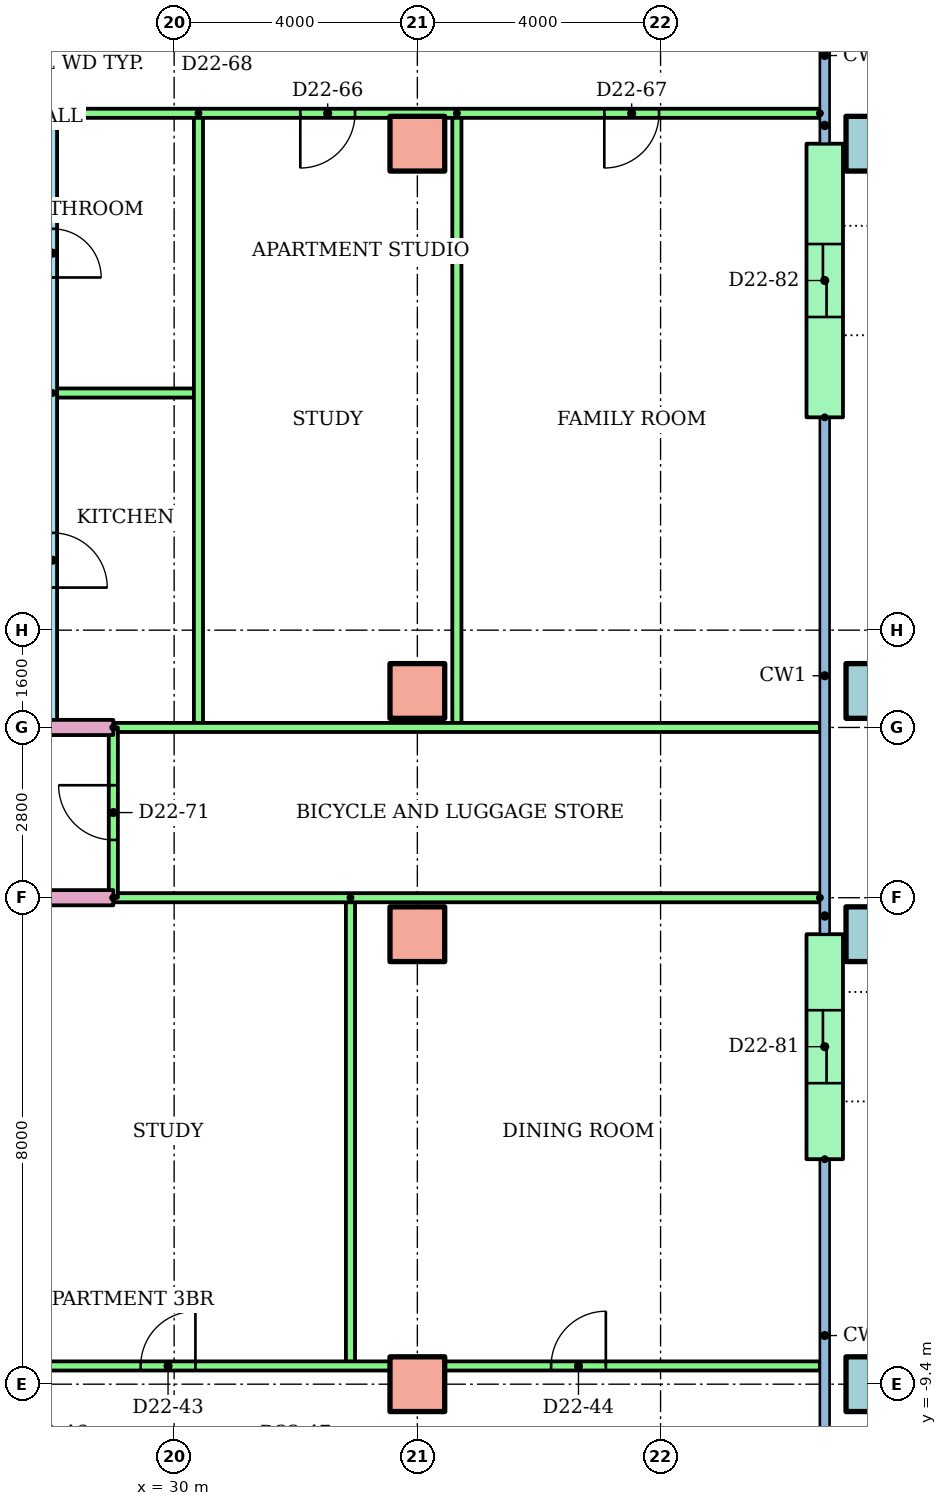
"""IFC4 building model, lengths in metres.
Left out: names, types, materials, properties, quantities, classifications, styles, units other than length and angle.
Written with IfcOpenShell. Run it as: python <this file> out.ifc"""

import sys

from ifc_helpers import new_model, si_unit, direction, frame, frame_2d, origin, origin_2d, place, context, subcontext, project, spatial, rectangle, hollow_rectangle, extrude, element, fill, save


model = new_model("IFC4")
c1 = context("Model", 3, precision=1e-05, world=origin(), true_north=direction((0.0, 1.0)))
c2 = subcontext(c1, "Body", "Model", "MODEL_VIEW")
j1 = project(units=[si_unit("LENGTHUNIT", "METRE"), si_unit("PLANEANGLEUNIT", "RADIAN")], contexts=[c1])
p1 = place(None, origin())
s1 = spatial("IfcSite", under=j1, at=p1, CompositionType="ELEMENT")
p2 = place(p1, origin())
s2 = spatial("IfcBuilding", under=s1, at=p2, CompositionType="ELEMENT")
p3 = place(p2, frame((0.0, 0.0, 87.1)))
s3 = spatial("IfcBuildingStorey", under=s2, at=p3, CompositionType="ELEMENT", Elevation=87.1)
p4 = place(p3, frame((34.0, -9.4, 0.0)))
e1 = element("IfcColumn", 1, at=p4, inside=s3, PredefinedType="COLUMN", context=c2, shape_type="SweptSolid", body=[
    extrude(rectangle(XDim=0.9, YDim=0.9, at=origin_2d()), origin(), (0.0, 0.0, 1.0), 3.2),
])
p5 = place(p3, frame((41.5, -9.4, 0.0)))
e2 = element("IfcColumn", 2, at=p5, inside=s3, PredefinedType="COLUMN", context=c2, shape_type="SweptSolid", body=[
    extrude(hollow_rectangle(XDim=0.9, YDim=0.9, WallThickness=0.045, at=origin_2d()), origin(), (0.0, 0.0, 1.0), 3.2),
])
p6 = place(p3, frame((34.0, -2.0, 0.0)))
e3 = element("IfcColumn", 3, at=p6, inside=s3, PredefinedType="COLUMN", context=c2, shape_type="SweptSolid", body=[
    extrude(rectangle(XDim=0.9, YDim=0.9, at=origin_2d()), origin(), (0.0, 0.0, 1.0), 3.2),
])
p7 = place(p3, frame((41.5, -2.0, 0.0)))
e4 = element("IfcColumn", 4, at=p7, inside=s3, PredefinedType="COLUMN", context=c2, shape_type="SweptSolid", body=[
    extrude(hollow_rectangle(XDim=0.9, YDim=0.9, WallThickness=0.045, at=origin_2d()), origin(), (0.0, 0.0, 1.0), 3.2),
])
p8 = place(p3, frame((34.0, 2.0, 0.0)))
e5 = element("IfcColumn", 5, at=p8, inside=s3, PredefinedType="COLUMN", context=c2, shape_type="SweptSolid", body=[
    extrude(rectangle(XDim=0.9, YDim=0.9, at=origin_2d()), origin(), (0.0, 0.0, 1.0), 3.2),
])
p9 = place(p3, frame((41.5, 2.0, 0.0)))
e6 = element("IfcColumn", 6, at=p9, inside=s3, PredefinedType="COLUMN", context=c2, shape_type="SweptSolid", body=[
    extrude(hollow_rectangle(XDim=0.9, YDim=0.9, WallThickness=0.045, at=origin_2d()), origin(), (0.0, 0.0, 1.0), 3.2),
])
p10 = place(p3, frame((34.0, 11.0, 0.0)))
e7 = element("IfcColumn", 7, at=p10, inside=s3, PredefinedType="COLUMN", context=c2, shape_type="SweptSolid", body=[
    extrude(rectangle(XDim=0.9, YDim=0.9, at=origin_2d()), origin(), (0.0, 0.0, 1.0), 3.2),
])
p11 = place(p3, frame((41.5, 11.0, 0.0)))
e8 = element("IfcColumn", 8, at=p11, inside=s3, PredefinedType="COLUMN", context=c2, shape_type="SweptSolid", body=[
    extrude(hollow_rectangle(XDim=0.9, YDim=0.9, WallThickness=0.045, at=origin_2d()), origin(), (0.0, 0.0, 1.0), 3.2),
])
p12 = place(p3, frame((40.7, -5.7, 0.0), z_axis=(0.0, 0.0, 1.0), x_axis=(0.0, 1.0, 0.0)))
e9 = element("IfcWall", 9, at=p12, inside=s3, PredefinedType="STANDARD", context=c2, shape_type="SweptSolid", body=[
    extrude(rectangle(XDim=3.7, YDim=0.6, at=frame_2d((1.85, 0.0))), origin(), (0.0, 0.0, 1.0), 2.92),
])
p13 = place(p12, frame((1.25, 0.0, 0.0)))
e10 = element("IfcOpeningElement", 10, at=p13, cuts=e9, PredefinedType="OPENING", context=c2, shape_type="SweptSolid", body=[
    extrude(rectangle(XDim=1.2, YDim=2.1, at=frame_2d((0.6, 1.05))), frame((0.0, 0.31, 0.0), z_axis=(0.0, -1.0, 0.0), x_axis=(1.0, 0.0, 0.0)), (0.0, 0.0, 1.0), 0.62),
])
p14 = place(p3, frame((40.7, 6.5, 0.0), z_axis=(0.0, 0.0, 1.0), x_axis=(0.0, 1.0, 0.0)))
e11 = element("IfcWall", 11, at=p14, inside=s3, PredefinedType="STANDARD", context=c2, shape_type="SweptSolid", body=[
    extrude(rectangle(XDim=4.5, YDim=0.6, at=frame_2d((2.25, 0.0))), origin(), (0.0, 0.0, 1.0), 2.92),
])
p15 = place(p14, frame((1.65, 0.0, 0.0)))
e12 = element("IfcOpeningElement", 12, at=p15, cuts=e11, PredefinedType="OPENING", context=c2, shape_type="SweptSolid", body=[
    extrude(rectangle(XDim=1.2, YDim=2.1, at=frame_2d((0.6, 1.05))), frame((0.0, 0.31, 0.0), z_axis=(0.0, -1.0, 0.0), x_axis=(1.0, 0.0, 0.0)), (0.0, 0.0, 1.0), 0.62),
])
p16 = place(p3, frame((32.9, -1.4, 0.0), z_axis=(0.0, 0.0, 1.0), x_axis=(0.0, -1.0, 0.0)))
e13 = element("IfcWall", 13, at=p16, inside=s3, PredefinedType="PARTITIONING", context=c2, shape_type="SweptSolid", body=[
    extrude(rectangle(XDim=7.7, YDim=0.15, at=frame_2d((3.85, 0.0))), origin(), (0.0, 0.0, 1.0), 2.4),
])
p17 = place(p3, frame((20.0, -9.1, 0.0)))
e14 = element("IfcWall", 14, at=p17, inside=s3, PredefinedType="PARTITIONING", context=c2, shape_type="SweptSolid", body=[
    extrude(rectangle(XDim=20.62, YDim=0.15, at=frame_2d((10.31, 0.0))), origin(), (0.0, 0.0, 1.0), 2.4),
])
p18 = place(p17, frame((4.2, 0.0, 0.0)))
e15 = element("IfcOpeningElement", 15, at=p18, cuts=e14, PredefinedType="OPENING", context=c2, shape_type="SweptSolid", body=[
    extrude(rectangle(XDim=0.9, YDim=2.1, at=frame_2d((0.45, 1.05))), frame((0.0, 0.085, 0.0), z_axis=(0.0, -1.0, 0.0), x_axis=(1.0, 0.0, 0.0)), (0.0, 0.0, 1.0), 0.17),
])
p19 = place(p17, frame((9.45, 0.0, 0.0)))
e16 = element("IfcOpeningElement", 16, at=p19, cuts=e14, PredefinedType="OPENING", context=c2, shape_type="SweptSolid", body=[
    extrude(rectangle(XDim=0.9, YDim=2.1, at=frame_2d((0.45, 1.05))), frame((0.0, 0.085, 0.0), z_axis=(0.0, -1.0, 0.0), x_axis=(1.0, 0.0, 0.0)), (0.0, 0.0, 1.0), 0.17),
])
p20 = place(p17, frame((16.2, 0.0, 0.0)))
e17 = element("IfcOpeningElement", 17, at=p20, cuts=e14, PredefinedType="OPENING", context=c2, shape_type="SweptSolid", body=[
    extrude(rectangle(XDim=0.9, YDim=2.1, at=frame_2d((0.45, 1.05))), frame((0.0, 0.085, 0.0), z_axis=(0.0, -1.0, 0.0), x_axis=(1.0, 0.0, 0.0)), (0.0, 0.0, 1.0), 0.17),
])
p21 = place(p3, frame((29.0, -1.4, 0.0), z_axis=(0.0, 0.0, 1.0), x_axis=(-1.0, 0.0, 0.0)))
e18 = element("IfcWall", 18, at=p21, inside=s3, PredefinedType="PARTITIONING", context=c2, shape_type="SweptSolid", body=[
    extrude(rectangle(XDim=15.0, YDim=0.25, at=frame_2d((7.5, 0.0))), origin(), (0.0, 0.0, 1.0), 2.4),
])
p22 = place(p21, frame((9.311, 0.0, 0.0)))
e19 = element("IfcOpeningElement", 19, at=p22, cuts=e18, PredefinedType="OPENING", context=c2, shape_type="SweptSolid", body=[
    extrude(rectangle(XDim=1.0, YDim=2.1, at=frame_2d((0.5, 1.05))), frame((0.0, 0.135, 0.0), z_axis=(0.0, -1.0, 0.0), x_axis=(1.0, 0.0, 0.0)), (0.0, 0.0, 1.0), 0.27),
])
p23 = place(p3, frame((40.62, -1.4, 0.0), z_axis=(0.0, 0.0, 1.0), x_axis=(-1.0, 0.0, 0.0)))
e20 = element("IfcWall", 20, at=p23, inside=s3, PredefinedType="PARTITIONING", context=c2, shape_type="SweptSolid", body=[
    extrude(rectangle(XDim=11.62, YDim=0.15, at=frame_2d((5.81, 0.0))), origin(), (0.0, 0.0, 1.0), 2.4),
])
p24 = place(p3, frame((28.0, 11.5, 0.0), z_axis=(0.0, 0.0, 1.0), x_axis=(0.0, -1.0, 0.0)))
e21 = element("IfcWall", 21, at=p24, inside=s3, PredefinedType="PARTITIONING", context=c2, shape_type="SweptSolid", body=[
    extrude(rectangle(XDim=10.1, YDim=0.15, at=frame_2d((5.05, 0.0))), origin(), (0.0, 0.0, 1.0), 2.4),
])
p25 = place(p24, frame((6.9, 0.0, 0.0)))
e22 = element("IfcOpeningElement", 22, at=p25, cuts=e21, PredefinedType="OPENING", context=c2, shape_type="SweptSolid", body=[
    extrude(rectangle(XDim=0.9, YDim=2.1, at=frame_2d((0.45, 1.05))), frame((0.0, 0.085, 0.0), z_axis=(0.0, -1.0, 0.0), x_axis=(1.0, 0.0, 0.0)), (0.0, 0.0, 1.0), 0.17),
])
p26 = place(p24, frame((1.9, 0.0, 0.0)))
e23 = element("IfcOpeningElement", 23, at=p26, cuts=e21, PredefinedType="OPENING", context=c2, shape_type="SweptSolid", body=[
    extrude(rectangle(XDim=0.8, YDim=2.1, at=frame_2d((0.4, 1.05))), frame((0.0, 0.085, 0.0), z_axis=(0.0, -1.0, 0.0), x_axis=(1.0, 0.0, 0.0)), (0.0, 0.0, 1.0), 0.17),
])
p27 = place(p3, frame((28.0, 6.9, 0.0)))
e24 = element("IfcWall", 24, at=p27, inside=s3, PredefinedType="PARTITIONING", context=c2, shape_type="SweptSolid", body=[
    extrude(rectangle(XDim=2.4, YDim=0.15, at=frame_2d((1.2, 0.0))), origin(), (0.0, 0.0, 1.0), 2.4),
])
for number, where, z_axis, x_axis in (
    (25, (30.4, 11.5, 0.0), (0.0, 0.0, 1.0), (0.0, -1.0, 0.0)),
    (26, (34.65, 11.5, 0.0), (0.0, 0.0, 1.0), (0.0, -1.0, 0.0)),
):
    element("IfcWall", number, at=place(p3, frame(where, z_axis=z_axis, x_axis=x_axis)), inside=s3, PredefinedType="PARTITIONING", context=c2, shape_type="SweptSolid", body=[
        extrude(rectangle(XDim=10.1, YDim=0.15, at=frame_2d((5.05, 0.0))), origin(), (0.0, 0.0, 1.0), 2.4),
    ])
p28 = place(p3, frame((40.62, 11.5, 0.0), z_axis=(0.0, 0.0, 1.0), x_axis=(-1.0, 0.0, 0.0)))
e27 = element("IfcWall", 27, at=p28, inside=s3, PredefinedType="PARTITIONING", context=c2, shape_type="SweptSolid", body=[
    extrude(rectangle(XDim=12.62, YDim=0.15, at=frame_2d((6.31, 0.0))), origin(), (0.0, 0.0, 1.0), 2.4),
])
p29 = place(p28, frame((7.645, 0.0, 0.0)))
e28 = element("IfcOpeningElement", 28, at=p29, cuts=e27, PredefinedType="OPENING", context=c2, shape_type="SweptSolid", body=[
    extrude(rectangle(XDim=0.9, YDim=2.1, at=frame_2d((0.45, 1.05))), frame((0.0, 0.085, 0.0), z_axis=(0.0, -1.0, 0.0), x_axis=(1.0, 0.0, 0.0)), (0.0, 0.0, 1.0), 0.17),
])
p30 = place(p28, frame((2.645, 0.0, 0.0)))
e29 = element("IfcOpeningElement", 29, at=p30, cuts=e27, PredefinedType="OPENING", context=c2, shape_type="SweptSolid", body=[
    extrude(rectangle(XDim=0.9, YDim=2.1, at=frame_2d((0.45, 1.05))), frame((0.0, 0.085, 0.0), z_axis=(0.0, -1.0, 0.0), x_axis=(1.0, 0.0, 0.0)), (0.0, 0.0, 1.0), 0.17),
])
p31 = place(p3, frame((14.0, 1.4, 0.0)))
e30 = element("IfcWall", 30, at=p31, inside=s3, PredefinedType="PARTITIONING", context=c2, shape_type="SweptSolid", body=[
    extrude(rectangle(XDim=15.0, YDim=0.25, at=frame_2d((7.5, 0.0))), origin(), (0.0, 0.0, 1.0), 2.4),
])
p32 = place(p31, frame((0.5, 0.0, 0.0)))
e31 = element("IfcOpeningElement", 31, at=p32, cuts=e30, PredefinedType="OPENING", context=c2, shape_type="SweptSolid", body=[
    extrude(rectangle(XDim=1.0, YDim=2.1, at=frame_2d((0.5, 1.05))), frame((0.0, 0.135, 0.0), z_axis=(0.0, -1.0, 0.0), x_axis=(1.0, 0.0, 0.0)), (0.0, 0.0, 1.0), 0.27),
])
p33 = place(p31, frame((12.689, 0.0, 0.0)))
e32 = element("IfcOpeningElement", 32, at=p33, cuts=e30, PredefinedType="OPENING", context=c2, shape_type="SweptSolid", body=[
    extrude(rectangle(XDim=1.0, YDim=2.1, at=frame_2d((0.5, 1.05))), frame((0.0, 0.135, 0.0), z_axis=(0.0, -1.0, 0.0), x_axis=(1.0, 0.0, 0.0)), (0.0, 0.0, 1.0), 0.27),
])
p34 = place(p3, frame((29.0, 1.4, 0.0)))
e33 = element("IfcWall", 33, at=p34, inside=s3, PredefinedType="PARTITIONING", context=c2, shape_type="SweptSolid", body=[
    extrude(rectangle(XDim=11.62, YDim=0.15, at=frame_2d((5.81, 0.0))), origin(), (0.0, 0.0, 1.0), 2.4),
])
p35 = place(p3, frame((29.0, -1.4, 0.0), z_axis=(0.0, 0.0, 1.0), x_axis=(0.0, 1.0, 0.0)))
e34 = element("IfcWall", 34, at=p35, inside=s3, PredefinedType="PARTITIONING", context=c2, shape_type="SweptSolid", body=[
    extrude(rectangle(XDim=2.8, YDim=0.15, at=frame_2d((1.4, 0.0))), origin(), (0.0, 0.0, 1.0), 2.4),
])
p36 = place(p35, frame((0.95, 0.0, 0.0)))
e35 = element("IfcOpeningElement", 35, at=p36, cuts=e34, PredefinedType="OPENING", context=c2, shape_type="SweptSolid", body=[
    extrude(rectangle(XDim=0.9, YDim=2.1, at=frame_2d((0.45, 1.05))), frame((0.0, 0.085, 0.0), z_axis=(0.0, -1.0, 0.0), x_axis=(1.0, 0.0, 0.0)), (0.0, 0.0, 1.0), 0.17),
])
p37 = place(p19, origin())
e36 = element("IfcDoor", 36, at=p37, inside=s3, OperationType="SINGLE_SWING_RIGHT", PredefinedType="DOOR", context=c2, shape_type="SweptSolid", body=[
    extrude(rectangle(XDim=0.9, YDim=2.1, at=frame_2d((0.45, 1.05))), frame((0.0, 0.025, 0.0), z_axis=(0.0, -1.0, 0.0), x_axis=(1.0, 0.0, 0.0)), (0.0, 0.0, 1.0), 0.05),
])
fill(e16, e36)
p38 = place(p20, origin())
e37 = element("IfcDoor", 37, at=p38, inside=s3, OperationType="SINGLE_SWING_RIGHT", PredefinedType="DOOR", context=c2, shape_type="SweptSolid", body=[
    extrude(rectangle(XDim=0.9, YDim=2.1, at=frame_2d((0.45, 1.05))), frame((0.0, 0.025, 0.0), z_axis=(0.0, -1.0, 0.0), x_axis=(1.0, 0.0, 0.0)), (0.0, 0.0, 1.0), 0.05),
])
fill(e17, e37)
p39 = place(p25, origin())
e38 = element("IfcDoor", 38, at=p39, inside=s3, OperationType="SINGLE_SWING_RIGHT", PredefinedType="DOOR", context=c2, shape_type="SweptSolid", body=[
    extrude(rectangle(XDim=0.9, YDim=2.1, at=frame_2d((0.45, 1.05))), frame((0.0, 0.025, 0.0), z_axis=(0.0, -1.0, 0.0), x_axis=(1.0, 0.0, 0.0)), (0.0, 0.0, 1.0), 0.05),
])
fill(e22, e38)
p40 = place(p26, origin())
e39 = element("IfcDoor", 39, at=p40, inside=s3, OperationType="SINGLE_SWING_RIGHT", PredefinedType="DOOR", context=c2, shape_type="SweptSolid", body=[
    extrude(rectangle(XDim=0.8, YDim=2.1, at=frame_2d((0.4, 1.05))), frame((0.0, 0.025, 0.0), z_axis=(0.0, -1.0, 0.0), x_axis=(1.0, 0.0, 0.0)), (0.0, 0.0, 1.0), 0.05),
])
fill(e23, e39)
p41 = place(p29, origin())
e40 = element("IfcDoor", 40, at=p41, inside=s3, OperationType="SINGLE_SWING_RIGHT", PredefinedType="DOOR", context=c2, shape_type="SweptSolid", body=[
    extrude(rectangle(XDim=0.9, YDim=2.1, at=frame_2d((0.45, 1.05))), frame((0.0, 0.025, 0.0), z_axis=(0.0, -1.0, 0.0), x_axis=(1.0, 0.0, 0.0)), (0.0, 0.0, 1.0), 0.05),
])
fill(e28, e40)
p42 = place(p30, origin())
e41 = element("IfcDoor", 41, at=p42, inside=s3, OperationType="SINGLE_SWING_RIGHT", PredefinedType="DOOR", context=c2, shape_type="SweptSolid", body=[
    extrude(rectangle(XDim=0.9, YDim=2.1, at=frame_2d((0.45, 1.05))), frame((0.0, 0.025, 0.0), z_axis=(0.0, -1.0, 0.0), x_axis=(1.0, 0.0, 0.0)), (0.0, 0.0, 1.0), 0.05),
])
fill(e29, e41)
p43 = place(p36, origin())
e42 = element("IfcDoor", 42, at=p43, inside=s3, OperationType="SINGLE_SWING_RIGHT", PredefinedType="DOOR", context=c2, shape_type="SweptSolid", body=[
    extrude(rectangle(XDim=0.9, YDim=2.1, at=frame_2d((0.45, 1.05))), frame((0.0, 0.025, 0.0), z_axis=(0.0, -1.0, 0.0), x_axis=(1.0, 0.0, 0.0)), (0.0, 0.0, 1.0), 0.05),
])
fill(e35, e42)
p44 = place(p13, origin())
e43 = element("IfcDoor", 43, at=p44, inside=s3, OperationType="SLIDING_TO_LEFT", PredefinedType="DOOR", context=c2, shape_type="SweptSolid", body=[
    extrude(rectangle(XDim=1.2, YDim=2.1, at=frame_2d((0.6, 1.05))), frame((0.0, 0.025, 0.0), z_axis=(0.0, -1.0, 0.0), x_axis=(1.0, 0.0, 0.0)), (0.0, 0.0, 1.0), 0.05),
])
fill(e10, e43)
p45 = place(p15, origin())
e44 = element("IfcDoor", 44, at=p45, inside=s3, OperationType="SLIDING_TO_LEFT", PredefinedType="DOOR", context=c2, shape_type="SweptSolid", body=[
    extrude(rectangle(XDim=1.2, YDim=2.1, at=frame_2d((0.6, 1.05))), frame((0.0, 0.025, 0.0), z_axis=(0.0, -1.0, 0.0), x_axis=(1.0, 0.0, 0.0)), (0.0, 0.0, 1.0), 0.05),
])
fill(e12, e44)
save(model, sys.argv[1])
